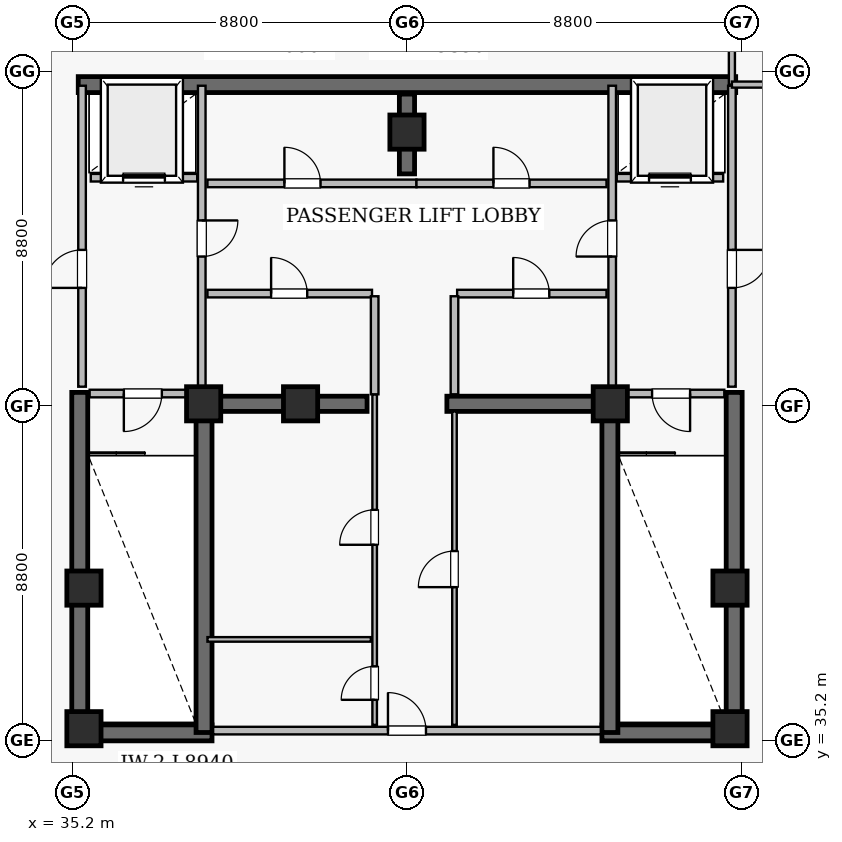
"""IFC4 building model, lengths in metres.
Left out: names, types, materials, properties, quantities, classifications, styles, units other than length and angle.
Written with IfcOpenShell. Run it as: python <this file> out.ifc"""

import sys

from ifc_helpers import new_model, si_unit, direction, frame, frame_2d, origin, origin_2d, place, context, subcontext, project, spatial, rectangle, extrude, element, fill, save


model = new_model("IFC4")
c1 = context("Model", 3, precision=1e-05, world=origin(), true_north=direction((0.0, 1.0)))
c2 = subcontext(c1, "Body", "Model", "MODEL_VIEW")
j1 = project(units=[si_unit("LENGTHUNIT", "METRE"), si_unit("PLANEANGLEUNIT", "RADIAN")], contexts=[c1])
p1 = place(None, origin())
s1 = spatial("IfcSite", under=j1, at=p1, CompositionType="ELEMENT")
p2 = place(p1, origin())
s2 = spatial("IfcBuilding", under=s1, at=p2, CompositionType="ELEMENT")
p3 = place(p2, frame((0.0, 0.0, 312.8)))
s3 = spatial("IfcBuildingStorey", under=s2, at=p3, CompositionType="ELEMENT", Elevation=312.8)
p4 = place(p3, frame((35.35, 52.45, 0.0), z_axis=(0.0, 0.0, 1.0), x_axis=(1.0, 0.0, 0.0)))
e1 = element("IfcWall", 1, at=p4, inside=s3, PredefinedType="SHEAR", context=c2, shape_type="SweptSolid", body=[
    extrude(rectangle(XDim=17.3, YDim=0.42, at=frame_2d((8.65, 0.0))), origin(), (0.0, 0.0, 1.0), 4.99),
])
for number, where, z_axis, x_axis in (
    (2, (35.18, 35.39, 0.0), (0.0, 0.0, 1.0), (1.0, 0.0, 0.0)),
    (3, (49.13, 35.39, 0.0), (0.0, 0.0, 1.0), (1.0, 0.0, 0.0)),
):
    element("IfcWall", number, at=place(p3, frame(where, z_axis=z_axis, x_axis=x_axis)), inside=s3, PredefinedType="SHEAR", context=c2, shape_type="SweptSolid", body=[
        extrude(rectangle(XDim=3.69, YDim=0.42, at=frame_2d((1.845, 0.0))), origin(), (0.0, 0.0, 1.0), 4.99),
    ])
for number, where, z_axis, x_axis in (
    (4, (35.39, 35.18, 0.0), (0.0, 0.0, 1.0), (0.0, 1.0, 0.0)),
    (5, (52.61, 35.18, 0.0), (0.0, 0.0, 1.0), (0.0, 1.0, 0.0)),
):
    element("IfcWall", number, at=place(p3, frame(where, z_axis=z_axis, x_axis=x_axis)), inside=s3, PredefinedType="SHEAR", context=c2, shape_type="SweptSolid", body=[
        extrude(rectangle(XDim=9.17, YDim=0.42, at=frame_2d((4.585, 0.0))), origin(), (0.0, 0.0, 1.0), 4.99),
    ])
for number, where, z_axis, x_axis in (
    (6, (38.66, 35.4, 0.0), (0.0, 0.0, 1.0), (0.0, 1.0, 0.0)),
    (7, (49.34, 35.4, 0.0), (0.0, 0.0, 1.0), (0.0, 1.0, 0.0)),
):
    element("IfcWall", number, at=place(p3, frame(where, z_axis=z_axis, x_axis=x_axis)), inside=s3, PredefinedType="SHEAR", context=c2, shape_type="SweptSolid", body=[
        extrude(rectangle(XDim=8.95, YDim=0.42, at=frame_2d((4.475, 0.0))), origin(), (0.0, 0.0, 1.0), 4.99),
    ])
p5 = place(p3, frame((44.0, 50.1, 0.0), z_axis=(0.0, 0.0, 1.0), x_axis=(0.0, 1.0, 0.0)))
e8 = element("IfcWall", 8, at=p5, inside=s3, PredefinedType="SHEAR", context=c2, shape_type="SweptSolid", body=[
    extrude(rectangle(XDim=2.1, YDim=0.4, at=frame_2d((1.05, 0.0))), origin(), (0.0, 0.0, 1.0), 4.99),
])
for number, where, z_axis, x_axis in (
    (9, (38.75, 44.05, 0.0), (0.0, 0.0, 1.0), (1.0, 0.0, 0.0)),
    (10, (45.05, 44.05, 0.0), (0.0, 0.0, 1.0), (1.0, 0.0, 0.0)),
):
    element("IfcWall", number, at=place(p3, frame(where, z_axis=z_axis, x_axis=x_axis)), inside=s3, PredefinedType="SHEAR", context=c2, shape_type="SweptSolid", body=[
        extrude(rectangle(XDim=4.2, YDim=0.4, at=frame_2d((2.1, 0.0))), origin(), (0.0, 0.0, 1.0), 4.99),
    ])
for number, where, z_axis, x_axis in (
    (11, (35.5, 35.5, 0.0), (0.0, 0.0, 1.0), (1.0, 0.0, 0.0)),
    (12, (38.65, 44.05, 0.0), (0.0, 0.0, 1.0), (1.0, 0.0, 0.0)),
    (13, (52.5, 35.5, 0.0), (0.0, 0.0, 1.0), (1.0, 0.0, 0.0)),
    (14, (52.5, 39.2, 0.0), (0.0, 0.0, 1.0), (1.0, 0.0, 0.0)),
    (15, (49.35, 44.05, 0.0), (0.0, 0.0, 1.0), (1.0, 0.0, 0.0)),
    (16, (44.0, 51.2, 0.0), (0.0, 0.0, 1.0), (1.0, 0.0, 0.0)),
    (17, (35.5, 39.2, 0.0), (0.0, 0.0, 1.0), (1.0, 0.0, 0.0)),
    (18, (41.2, 44.05, 0.0), (0.0, 0.0, 1.0), (1.0, 0.0, 0.0)),
):
    element("IfcColumn", number, at=place(p3, frame(where, z_axis=z_axis, x_axis=x_axis)), inside=s3, PredefinedType="COLUMN", context=c2, shape_type="SweptSolid", body=[
        extrude(rectangle(XDim=0.9, YDim=0.9, at=origin_2d()), origin(), (0.0, 0.0, 1.0), 5.2),
    ])
p6 = place(p3, frame((38.9, 35.45, 0.0), z_axis=(0.0, 0.0, 1.0), x_axis=(1.0, 0.0, 0.0)))
e19 = element("IfcWall", 19, at=p6, inside=s3, PredefinedType="SOLIDWALL", context=c2, shape_type="SweptSolid", body=[
    extrude(rectangle(XDim=10.2, YDim=0.2, at=frame_2d((5.1, 0.0))), origin(), (0.0, 0.0, 1.0), 4.99),
])
p7 = place(p6, frame((4.6, 0.0, 0.0)))
e20 = element("IfcOpeningElement", 20, at=p7, cuts=e19, PredefinedType="OPENING", context=c2, shape_type="SweptSolid", body=[
    extrude(rectangle(XDim=1.0, YDim=2.15, at=frame_2d((0.5, 1.075))), frame((0.0, 0.11, 0.0), z_axis=(0.0, -1.0, 0.0), x_axis=(1.0, 0.0, 0.0)), (0.0, 0.0, 1.0), 0.22),
])
p8 = place(p3, frame((43.15, 35.6, 0.0), z_axis=(0.0, 0.0, 1.0), x_axis=(0.0, 1.0, 0.0)))
e21 = element("IfcWall", 21, at=p8, inside=s3, PredefinedType="PARTITIONING", context=c2, shape_type="SweptSolid", body=[
    extrude(rectangle(XDim=8.7, YDim=0.12, at=frame_2d((4.35, 0.0))), origin(), (0.0, 0.0, 1.0), 4.99),
])
p9 = place(p8, frame((0.66, 0.0, 0.0)))
e22 = element("IfcOpeningElement", 22, at=p9, cuts=e21, PredefinedType="OPENING", context=c2, shape_type="SweptSolid", body=[
    extrude(rectangle(XDim=0.88, YDim=2.1, at=frame_2d((0.44, 1.05))), frame((0.0, 0.07, 0.0), z_axis=(0.0, -1.0, 0.0), x_axis=(1.0, 0.0, 0.0)), (0.0, 0.0, 1.0), 0.14),
])
p10 = place(p8, frame((4.74, 0.0, 0.0)))
e23 = element("IfcOpeningElement", 23, at=p10, cuts=e21, PredefinedType="OPENING", context=c2, shape_type="SweptSolid", body=[
    extrude(rectangle(XDim=0.92, YDim=2.1, at=frame_2d((0.46, 1.05))), frame((0.0, 0.07, 0.0), z_axis=(0.0, -1.0, 0.0), x_axis=(1.0, 0.0, 0.0)), (0.0, 0.0, 1.0), 0.14),
])
p11 = place(p3, frame((45.25, 35.6, 0.0), z_axis=(0.0, 0.0, 1.0), x_axis=(0.0, 1.0, 0.0)))
e24 = element("IfcWall", 24, at=p11, inside=s3, PredefinedType="PARTITIONING", context=c2, shape_type="SweptSolid", body=[
    extrude(rectangle(XDim=8.25, YDim=0.12, at=frame_2d((4.125, 0.0))), origin(), (0.0, 0.0, 1.0), 4.99),
])
p12 = place(p11, frame((3.625, 0.0, 0.0)))
e25 = element("IfcOpeningElement", 25, at=p12, cuts=e24, PredefinedType="OPENING", context=c2, shape_type="SweptSolid", body=[
    extrude(rectangle(XDim=0.95, YDim=2.1, at=frame_2d((0.475, 1.05))), frame((0.0, 0.07, 0.0), z_axis=(0.0, -1.0, 0.0), x_axis=(1.0, 0.0, 0.0)), (0.0, 0.0, 1.0), 0.14),
])
p13 = place(p3, frame((35.45, 44.5, 0.0), z_axis=(0.0, 0.0, 1.0), x_axis=(0.0, 1.0, 0.0)))
e26 = element("IfcWall", 26, at=p13, inside=s3, PredefinedType="SOLIDWALL", context=c2, shape_type="SweptSolid", body=[
    extrude(rectangle(XDim=7.92, YDim=0.2, at=frame_2d((3.96, 0.0))), origin(), (0.0, 0.0, 1.0), 4.99),
])
p14 = place(p13, frame((2.6, 0.0, 0.0)))
e27 = element("IfcOpeningElement", 27, at=p14, cuts=e26, PredefinedType="OPENING", context=c2, shape_type="SweptSolid", body=[
    extrude(rectangle(XDim=1.0, YDim=2.15, at=frame_2d((0.5, 1.075))), frame((0.0, 0.11, 0.0), z_axis=(0.0, -1.0, 0.0), x_axis=(1.0, 0.0, 0.0)), (0.0, 0.0, 1.0), 0.22),
])
p15 = place(p3, frame((52.55, 44.5, 0.0), z_axis=(0.0, 0.0, 1.0), x_axis=(0.0, 1.0, 0.0)))
e28 = element("IfcWall", 28, at=p15, inside=s3, PredefinedType="SOLIDWALL", context=c2, shape_type="SweptSolid", body=[
    extrude(rectangle(XDim=7.92, YDim=0.2, at=frame_2d((3.96, 0.0))), origin(), (0.0, 0.0, 1.0), 4.99),
])
p16 = place(p15, frame((2.6, 0.0, 0.0)))
e29 = element("IfcOpeningElement", 29, at=p16, cuts=e28, PredefinedType="OPENING", context=c2, shape_type="SweptSolid", body=[
    extrude(rectangle(XDim=1.0, YDim=2.15, at=frame_2d((0.5, 1.075))), frame((0.0, 0.11, 0.0), z_axis=(0.0, -1.0, 0.0), x_axis=(1.0, 0.0, 0.0)), (0.0, 0.0, 1.0), 0.22),
])
p17 = place(p3, frame((38.6, 44.5, 0.0), z_axis=(0.0, 0.0, 1.0), x_axis=(0.0, 1.0, 0.0)))
e30 = element("IfcWall", 30, at=p17, inside=s3, PredefinedType="SOLIDWALL", context=c2, shape_type="SweptSolid", body=[
    extrude(rectangle(XDim=7.92, YDim=0.2, at=frame_2d((3.96, 0.0))), origin(), (0.0, 0.0, 1.0), 4.99),
])
p18 = place(p17, frame((3.425, 0.0, 0.0)))
e31 = element("IfcOpeningElement", 31, at=p18, cuts=e30, PredefinedType="OPENING", context=c2, shape_type="SweptSolid", body=[
    extrude(rectangle(XDim=0.95, YDim=2.15, at=frame_2d((0.475, 1.075))), frame((0.0, 0.11, 0.0), z_axis=(0.0, -1.0, 0.0), x_axis=(1.0, 0.0, 0.0)), (0.0, 0.0, 1.0), 0.22),
])
p19 = place(p3, frame((49.4, 44.5, 0.0), z_axis=(0.0, 0.0, 1.0), x_axis=(0.0, 1.0, 0.0)))
e32 = element("IfcWall", 32, at=p19, inside=s3, PredefinedType="SOLIDWALL", context=c2, shape_type="SweptSolid", body=[
    extrude(rectangle(XDim=7.92, YDim=0.2, at=frame_2d((3.96, 0.0))), origin(), (0.0, 0.0, 1.0), 4.078),
])
p20 = place(p19, frame((3.425, 0.0, 0.0)))
e33 = element("IfcOpeningElement", 33, at=p20, cuts=e32, PredefinedType="OPENING", context=c2, shape_type="SweptSolid", body=[
    extrude(rectangle(XDim=0.95, YDim=2.15, at=frame_2d((0.475, 1.075))), frame((0.0, 0.11, 0.0), z_axis=(0.0, -1.0, 0.0), x_axis=(1.0, 0.0, 0.0)), (0.0, 0.0, 1.0), 0.22),
])
p21 = place(p3, frame((38.75, 49.85, 0.0), z_axis=(0.0, 0.0, 1.0), x_axis=(1.0, 0.0, 0.0)))
e34 = element("IfcWall", 34, at=p21, inside=s3, PredefinedType="SOLIDWALL", context=c2, shape_type="SweptSolid", body=[
    extrude(rectangle(XDim=5.5, YDim=0.2, at=frame_2d((2.75, 0.0))), origin(), (0.0, 0.0, 1.0), 4.99),
])
p22 = place(p21, frame((2.025, 0.0, 0.0)))
e35 = element("IfcOpeningElement", 35, at=p22, cuts=e34, PredefinedType="OPENING", context=c2, shape_type="SweptSolid", body=[
    extrude(rectangle(XDim=0.95, YDim=2.15, at=frame_2d((0.475, 1.075))), frame((0.0, 0.11, 0.0), z_axis=(0.0, -1.0, 0.0), x_axis=(1.0, 0.0, 0.0)), (0.0, 0.0, 1.0), 0.22),
])
p23 = place(p3, frame((44.25, 49.85, 0.0), z_axis=(0.0, 0.0, 1.0), x_axis=(1.0, 0.0, 0.0)))
e36 = element("IfcWall", 36, at=p23, inside=s3, PredefinedType="SOLIDWALL", context=c2, shape_type="SweptSolid", body=[
    extrude(rectangle(XDim=5.0, YDim=0.2, at=frame_2d((2.5, 0.0))), origin(), (0.0, 0.0, 1.0), 4.078),
])
p24 = place(p23, frame((2.025, 0.0, 0.0)))
e37 = element("IfcOpeningElement", 37, at=p24, cuts=e36, PredefinedType="OPENING", context=c2, shape_type="SweptSolid", body=[
    extrude(rectangle(XDim=0.95, YDim=2.15, at=frame_2d((0.475, 1.075))), frame((0.0, 0.11, 0.0), z_axis=(0.0, -1.0, 0.0), x_axis=(1.0, 0.0, 0.0)), (0.0, 0.0, 1.0), 0.22),
])
p25 = place(p3, frame((38.75, 46.95, 0.0), z_axis=(0.0, 0.0, 1.0), x_axis=(1.0, 0.0, 0.0)))
e38 = element("IfcWall", 38, at=p25, inside=s3, PredefinedType="SOLIDWALL", context=c2, shape_type="SweptSolid", body=[
    extrude(rectangle(XDim=4.33, YDim=0.2, at=frame_2d((2.165, 0.0))), origin(), (0.0, 0.0, 1.0), 4.99),
])
p26 = place(p25, frame((1.675, 0.0, 0.0)))
e39 = element("IfcOpeningElement", 39, at=p26, cuts=e38, PredefinedType="OPENING", context=c2, shape_type="SweptSolid", body=[
    extrude(rectangle(XDim=0.95, YDim=2.1, at=frame_2d((0.475, 1.05))), frame((0.0, 0.11, 0.0), z_axis=(0.0, -1.0, 0.0), x_axis=(1.0, 0.0, 0.0)), (0.0, 0.0, 1.0), 0.22),
])
p27 = place(p3, frame((45.32, 46.95, 0.0), z_axis=(0.0, 0.0, 1.0), x_axis=(1.0, 0.0, 0.0)))
e40 = element("IfcWall", 40, at=p27, inside=s3, PredefinedType="SOLIDWALL", context=c2, shape_type="SweptSolid", body=[
    extrude(rectangle(XDim=3.93, YDim=0.2, at=frame_2d((1.965, 0.0))), origin(), (0.0, 0.0, 1.0), 4.078),
])
p28 = place(p27, frame((1.475, 0.0, 0.0)))
e41 = element("IfcOpeningElement", 41, at=p28, cuts=e40, PredefinedType="OPENING", context=c2, shape_type="SweptSolid", body=[
    extrude(rectangle(XDim=0.95, YDim=2.1, at=frame_2d((0.475, 1.05))), frame((0.0, 0.11, 0.0), z_axis=(0.0, -1.0, 0.0), x_axis=(1.0, 0.0, 0.0)), (0.0, 0.0, 1.0), 0.22),
])
p29 = place(p3, frame((35.65, 44.32, 0.0), z_axis=(0.0, 0.0, 1.0), x_axis=(1.0, 0.0, 0.0)))
e42 = element("IfcWall", 42, at=p29, inside=s3, PredefinedType="SOLIDWALL", context=c2, shape_type="SweptSolid", body=[
    extrude(rectangle(XDim=2.8, YDim=0.2, at=frame_2d((1.4, 0.0))), origin(), (0.0, 0.0, 1.0), 4.99),
])
p30 = place(p29, frame((0.9, 0.0, 0.0)))
e43 = element("IfcOpeningElement", 43, at=p30, cuts=e42, PredefinedType="OPENING", context=c2, shape_type="SweptSolid", body=[
    extrude(rectangle(XDim=1.0, YDim=2.15, at=frame_2d((0.5, 1.075))), frame((0.0, 0.11, 0.0), z_axis=(0.0, -1.0, 0.0), x_axis=(1.0, 0.0, 0.0)), (0.0, 0.0, 1.0), 0.22),
])
p31 = place(p3, frame((49.55, 44.32, 0.0), z_axis=(0.0, 0.0, 1.0), x_axis=(1.0, 0.0, 0.0)))
e44 = element("IfcWall", 44, at=p31, inside=s3, PredefinedType="SOLIDWALL", context=c2, shape_type="SweptSolid", body=[
    extrude(rectangle(XDim=2.8, YDim=0.2, at=frame_2d((1.4, 0.0))), origin(), (0.0, 0.0, 1.0), 4.078),
])
p32 = place(p31, frame((0.9, 0.0, 0.0)))
e45 = element("IfcOpeningElement", 45, at=p32, cuts=e44, PredefinedType="OPENING", context=c2, shape_type="SweptSolid", body=[
    extrude(rectangle(XDim=1.0, YDim=2.15, at=frame_2d((0.5, 1.075))), frame((0.0, 0.11, 0.0), z_axis=(0.0, -1.0, 0.0), x_axis=(1.0, 0.0, 0.0)), (0.0, 0.0, 1.0), 0.22),
])
p33 = place(p3, frame((35.68, 50.0, 0.0), z_axis=(0.0, 0.0, 1.0), x_axis=(1.0, 0.0, 0.0)))
e46 = element("IfcWall", 46, at=p33, inside=s3, PredefinedType="SOLIDWALL", context=c2, shape_type="SweptSolid", body=[
    extrude(rectangle(XDim=2.8, YDim=0.2, at=frame_2d((1.4, 0.0))), origin(), (0.0, 0.0, 1.0), 4.99),
])
p34 = place(p33, frame((0.85, 0.0, 0.0)))
e47 = element("IfcOpeningElement", 47, at=p34, cuts=e46, PredefinedType="OPENING", context=c2, shape_type="SweptSolid", body=[
    extrude(rectangle(XDim=1.1, YDim=2.15, at=frame_2d((0.55, 1.075))), frame((0.0, 0.11, 0.0), z_axis=(0.0, -1.0, 0.0), x_axis=(1.0, 0.0, 0.0)), (0.0, 0.0, 1.0), 0.22),
])
p35 = place(p3, frame((49.52, 50.0, 0.0), z_axis=(0.0, 0.0, 1.0), x_axis=(1.0, 0.0, 0.0)))
e48 = element("IfcWall", 48, at=p35, inside=s3, PredefinedType="SOLIDWALL", context=c2, shape_type="SweptSolid", body=[
    extrude(rectangle(XDim=2.8, YDim=0.2, at=frame_2d((1.4, 0.0))), origin(), (0.0, 0.0, 1.0), 4.99),
])
p36 = place(p35, frame((0.85, 0.0, 0.0)))
e49 = element("IfcOpeningElement", 49, at=p36, cuts=e48, PredefinedType="OPENING", context=c2, shape_type="SweptSolid", body=[
    extrude(rectangle(XDim=1.1, YDim=2.15, at=frame_2d((0.55, 1.075))), frame((0.0, 0.11, 0.0), z_axis=(0.0, -1.0, 0.0), x_axis=(1.0, 0.0, 0.0)), (0.0, 0.0, 1.0), 0.22),
])
p37 = place(p3, frame((38.75, 37.85, 0.0), z_axis=(0.0, 0.0, 1.0), x_axis=(1.0, 0.0, 0.0)))
e50 = element("IfcWall", 50, at=p37, inside=s3, PredefinedType="PARTITIONING", context=c2, shape_type="SweptSolid", body=[
    extrude(rectangle(XDim=4.3, YDim=0.12, at=frame_2d((2.15, 0.0))), origin(), (0.0, 0.0, 1.0), 4.99),
])
for number, where, z_axis, x_axis in (
    (51, (43.15, 44.3, 0.0), (0.0, 0.0, 1.0), (0.0, 1.0, 0.0)),
    (52, (45.25, 44.3, 0.0), (0.0, 0.0, 1.0), (0.0, 1.0, 0.0)),
):
    element("IfcWall", number, at=place(p3, frame(where, z_axis=z_axis, x_axis=x_axis)), inside=s3, PredefinedType="SOLIDWALL", context=c2, shape_type="SweptSolid", body=[
        extrude(rectangle(XDim=2.58, YDim=0.2, at=frame_2d((1.29, 0.0))), origin(), (0.0, 0.0, 1.0), 4.99),
    ])
p38 = place(p3, frame((52.55, 52.45, 0.0), z_axis=(0.0, 0.0, 1.0), x_axis=(0.0, 1.0, 0.0)))
e53 = element("IfcWall", 53, at=p38, inside=s3, PredefinedType="SOLIDWALL", context=c2, shape_type="SweptSolid", body=[
    extrude(rectangle(XDim=2.15, YDim=0.16, at=frame_2d((1.075, 0.0))), origin(), (0.0, 0.0, 1.0), 4.178),
])
p39 = place(p3, frame((54.52, 52.45, 0.0), z_axis=(0.0, 0.0, 1.0), x_axis=(-1.0, 0.0, 0.0)))
e54 = element("IfcWall", 54, at=p39, inside=s3, PredefinedType="SOLIDWALL", context=c2, shape_type="SweptSolid", body=[
    extrude(rectangle(XDim=1.97, YDim=0.16, at=frame_2d((0.985, 0.0))), origin(), (0.0, 0.0, 1.0), 4.178),
])
p40 = place(p30, frame((1.0, 0.0, 0.0), z_axis=(0.0, 0.0, 1.0), x_axis=(-1.0, 0.0, 0.0)))
e55 = element("IfcDoor", 55, at=p40, inside=s3, OperationType="SINGLE_SWING_LEFT", PredefinedType="DOOR", context=c2, shape_type="SweptSolid", body=[
    extrude(rectangle(XDim=1.0, YDim=2.15, at=frame_2d((0.5, 1.075))), frame((0.0, 0.025, 0.0), z_axis=(0.0, -1.0, 0.0), x_axis=(1.0, 0.0, 0.0)), (0.0, 0.0, 1.0), 0.05),
])
fill(e43, e55)
p41 = place(p32, frame((1.0, 0.0, 0.0), z_axis=(0.0, 0.0, 1.0), x_axis=(-1.0, 0.0, 0.0)))
e56 = element("IfcDoor", 56, at=p41, inside=s3, OperationType="SINGLE_SWING_RIGHT", PredefinedType="DOOR", context=c2, shape_type="SweptSolid", body=[
    extrude(rectangle(XDim=1.0, YDim=2.15, at=frame_2d((0.5, 1.075))), frame((0.0, 0.025, 0.0), z_axis=(0.0, -1.0, 0.0), x_axis=(1.0, 0.0, 0.0)), (0.0, 0.0, 1.0), 0.05),
])
fill(e45, e56)
p42 = place(p14, origin())
e57 = element("IfcDoor", 57, at=p42, inside=s3, OperationType="SINGLE_SWING_LEFT", PredefinedType="DOOR", context=c2, shape_type="SweptSolid", body=[
    extrude(rectangle(XDim=1.0, YDim=2.15, at=frame_2d((0.5, 1.075))), frame((0.0, 0.025, 0.0), z_axis=(0.0, -1.0, 0.0), x_axis=(1.0, 0.0, 0.0)), (0.0, 0.0, 1.0), 0.05),
])
fill(e27, e57)
p43 = place(p16, frame((1.0, 0.0, 0.0), z_axis=(0.0, 0.0, 1.0), x_axis=(-1.0, 0.0, 0.0)))
e58 = element("IfcDoor", 58, at=p43, inside=s3, OperationType="SINGLE_SWING_RIGHT", PredefinedType="DOOR", context=c2, shape_type="SweptSolid", body=[
    extrude(rectangle(XDim=1.0, YDim=2.15, at=frame_2d((0.5, 1.075))), frame((0.0, 0.025, 0.0), z_axis=(0.0, -1.0, 0.0), x_axis=(1.0, 0.0, 0.0)), (0.0, 0.0, 1.0), 0.05),
])
fill(e29, e58)
p44 = place(p18, frame((0.95, 0.0, 0.0), z_axis=(0.0, 0.0, 1.0), x_axis=(-1.0, 0.0, 0.0)))
e59 = element("IfcDoor", 59, at=p44, inside=s3, OperationType="SINGLE_SWING_RIGHT", PredefinedType="DOOR", context=c2, shape_type="SweptSolid", body=[
    extrude(rectangle(XDim=0.95, YDim=2.15, at=frame_2d((0.475, 1.075))), frame((0.0, 0.025, 0.0), z_axis=(0.0, -1.0, 0.0), x_axis=(1.0, 0.0, 0.0)), (0.0, 0.0, 1.0), 0.05),
])
fill(e31, e59)
p45 = place(p20, origin())
e60 = element("IfcDoor", 60, at=p45, inside=s3, OperationType="SINGLE_SWING_LEFT", PredefinedType="DOOR", context=c2, shape_type="SweptSolid", body=[
    extrude(rectangle(XDim=0.95, YDim=2.15, at=frame_2d((0.475, 1.075))), frame((0.0, 0.025, 0.0), z_axis=(0.0, -1.0, 0.0), x_axis=(1.0, 0.0, 0.0)), (0.0, 0.0, 1.0), 0.05),
])
fill(e33, e60)
p46 = place(p34, origin())
e61 = element("IfcDoor", 61, at=p46, inside=s3, OperationType="SLIDING_TO_LEFT", PredefinedType="DOOR", context=c2, shape_type="SweptSolid", body=[
    extrude(rectangle(XDim=1.1, YDim=2.15, at=frame_2d((0.55, 1.075))), frame((0.0, 0.025, 0.0), z_axis=(0.0, -1.0, 0.0), x_axis=(1.0, 0.0, 0.0)), (0.0, 0.0, 1.0), 0.05),
])
fill(e47, e61)
p47 = place(p36, origin())
e62 = element("IfcDoor", 62, at=p47, inside=s3, OperationType="SLIDING_TO_LEFT", PredefinedType="DOOR", context=c2, shape_type="SweptSolid", body=[
    extrude(rectangle(XDim=1.1, YDim=2.15, at=frame_2d((0.55, 1.075))), frame((0.0, 0.025, 0.0), z_axis=(0.0, -1.0, 0.0), x_axis=(1.0, 0.0, 0.0)), (0.0, 0.0, 1.0), 0.05),
])
fill(e49, e62)
p48 = place(p7, origin())
e63 = element("IfcDoor", 63, at=p48, inside=s3, OperationType="SINGLE_SWING_LEFT", PredefinedType="DOOR", context=c2, shape_type="SweptSolid", body=[
    extrude(rectangle(XDim=1.0, YDim=2.15, at=frame_2d((0.5, 1.075))), frame((0.0, 0.025, 0.0), z_axis=(0.0, -1.0, 0.0), x_axis=(1.0, 0.0, 0.0)), (0.0, 0.0, 1.0), 0.05),
])
fill(e20, e63)
p49 = place(p22, origin())
e64 = element("IfcDoor", 64, at=p49, inside=s3, OperationType="SINGLE_SWING_LEFT", PredefinedType="DOOR", context=c2, shape_type="SweptSolid", body=[
    extrude(rectangle(XDim=0.95, YDim=2.15, at=frame_2d((0.475, 1.075))), frame((0.0, 0.025, 0.0), z_axis=(0.0, -1.0, 0.0), x_axis=(1.0, 0.0, 0.0)), (0.0, 0.0, 1.0), 0.05),
])
fill(e35, e64)
p50 = place(p24, origin())
e65 = element("IfcDoor", 65, at=p50, inside=s3, OperationType="SINGLE_SWING_LEFT", PredefinedType="DOOR", context=c2, shape_type="SweptSolid", body=[
    extrude(rectangle(XDim=0.95, YDim=2.15, at=frame_2d((0.475, 1.075))), frame((0.0, 0.025, 0.0), z_axis=(0.0, -1.0, 0.0), x_axis=(1.0, 0.0, 0.0)), (0.0, 0.0, 1.0), 0.05),
])
fill(e37, e65)
p51 = place(p26, origin())
e66 = element("IfcDoor", 66, at=p51, inside=s3, OperationType="SINGLE_SWING_LEFT", PredefinedType="DOOR", context=c2, shape_type="SweptSolid", body=[
    extrude(rectangle(XDim=0.95, YDim=2.1, at=frame_2d((0.475, 1.05))), frame((0.0, 0.025, 0.0), z_axis=(0.0, -1.0, 0.0), x_axis=(1.0, 0.0, 0.0)), (0.0, 0.0, 1.0), 0.05),
])
fill(e39, e66)
p52 = place(p28, origin())
e67 = element("IfcDoor", 67, at=p52, inside=s3, OperationType="SINGLE_SWING_LEFT", PredefinedType="DOOR", context=c2, shape_type="SweptSolid", body=[
    extrude(rectangle(XDim=0.95, YDim=2.1, at=frame_2d((0.475, 1.05))), frame((0.0, 0.025, 0.0), z_axis=(0.0, -1.0, 0.0), x_axis=(1.0, 0.0, 0.0)), (0.0, 0.0, 1.0), 0.05),
])
fill(e41, e67)
p53 = place(p9, origin())
e68 = element("IfcDoor", 68, at=p53, inside=s3, OperationType="SINGLE_SWING_LEFT", PredefinedType="DOOR", context=c2, shape_type="SweptSolid", body=[
    extrude(rectangle(XDim=0.88, YDim=2.1, at=frame_2d((0.44, 1.05))), frame((0.0, 0.025, 0.0), z_axis=(0.0, -1.0, 0.0), x_axis=(1.0, 0.0, 0.0)), (0.0, 0.0, 1.0), 0.05),
])
fill(e22, e68)
p54 = place(p10, origin())
e69 = element("IfcDoor", 69, at=p54, inside=s3, OperationType="SINGLE_SWING_LEFT", PredefinedType="DOOR", context=c2, shape_type="SweptSolid", body=[
    extrude(rectangle(XDim=0.92, YDim=2.1, at=frame_2d((0.46, 1.05))), frame((0.0, 0.025, 0.0), z_axis=(0.0, -1.0, 0.0), x_axis=(1.0, 0.0, 0.0)), (0.0, 0.0, 1.0), 0.05),
])
fill(e23, e69)
p55 = place(p12, origin())
e70 = element("IfcDoor", 70, at=p55, inside=s3, OperationType="SINGLE_SWING_LEFT", PredefinedType="DOOR", context=c2, shape_type="SweptSolid", body=[
    extrude(rectangle(XDim=0.95, YDim=2.1, at=frame_2d((0.475, 1.05))), frame((0.0, 0.025, 0.0), z_axis=(0.0, -1.0, 0.0), x_axis=(1.0, 0.0, 0.0)), (0.0, 0.0, 1.0), 0.05),
])
fill(e25, e70)
save(model, sys.argv[1])
